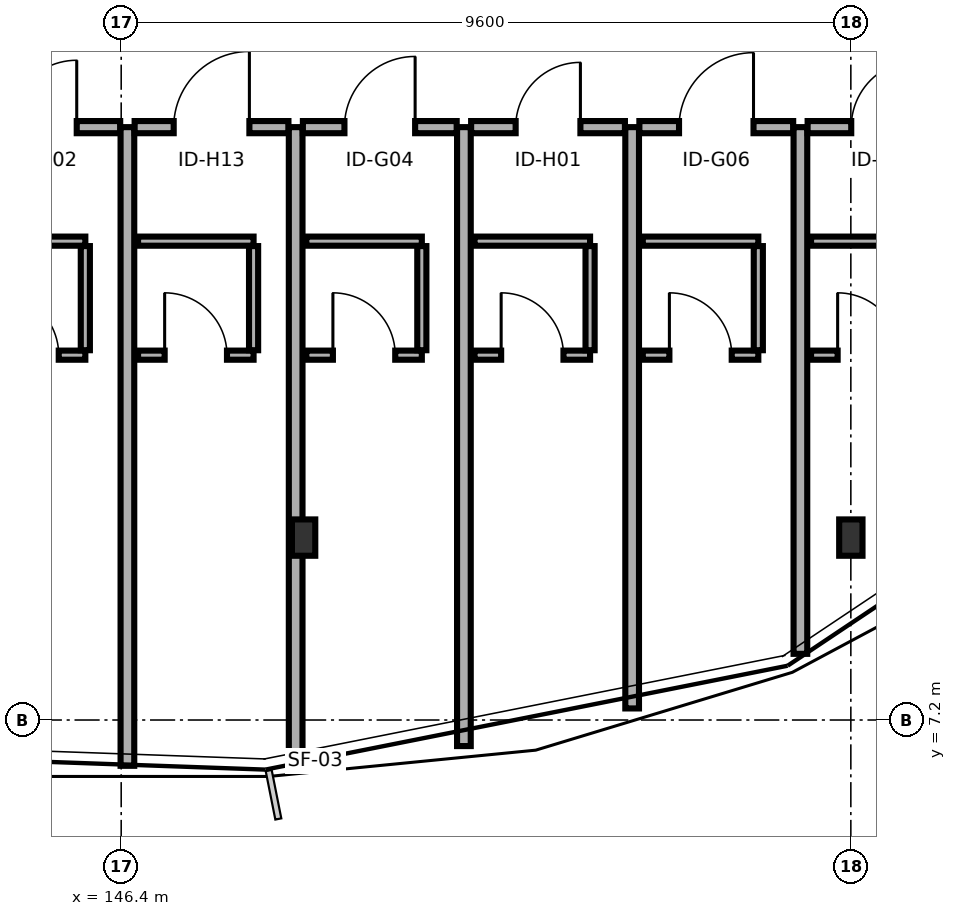
"""IFC4 building model, lengths in metres.
Left out: names, types, materials, properties, quantities, classifications, styles, units other than length and angle.
Written with IfcOpenShell. Run it as: python <this file> out.ifc"""

import sys

from ifc_helpers import new_model, si_unit, direction, frame, frame_2d, origin, origin_2d, place, context, subcontext, project, spatial, rectangle, i_section, extrude, element, fill, save


model = new_model("IFC4")
c1 = context("Model", 3, precision=1e-05, world=origin(), true_north=direction((0.0, 1.0)))
c2 = subcontext(c1, "Body", "Model", "MODEL_VIEW")
j1 = project(units=[si_unit("LENGTHUNIT", "METRE"), si_unit("PLANEANGLEUNIT", "RADIAN")], contexts=[c1])
p1 = place(None, origin())
s1 = spatial("IfcSite", under=j1, at=p1, CompositionType="ELEMENT")
p2 = place(p1, origin())
s2 = spatial("IfcBuilding", under=s1, at=p2, CompositionType="ELEMENT")
p3 = place(p2, frame((0.0, 0.0, 18.1)))
s3 = spatial("IfcBuildingStorey", under=s2, at=p3, CompositionType="ELEMENT", Elevation=18.1)
for number, where, z_axis, x_axis in (
    (1, (148.8, 9.6, 0.0), (0.0, 0.0, 1.0), (1.0, 0.0, 0.0)),
    (2, (156.0, 9.6, 0.0), (0.0, 0.0, 1.0), (1.0, 0.0, 0.0)),
):
    element("IfcColumn", number, at=place(p3, frame(where, z_axis=z_axis, x_axis=x_axis)), inside=s3, PredefinedType="COLUMN", context=c2, shape_type="SweptSolid", body=[
        extrude(i_section(OverallWidth=0.307, OverallDepth=0.478, WebThickness=0.021, FlangeThickness=0.04, FilletRadius=0.027, at=origin_2d()), origin(), (0.0, 0.0, 1.0), 3.4),
    ])
p4 = place(p3, frame((144.363, 15.0, 0.0), z_axis=(0.0, 0.0, 1.0), x_axis=(1.0, 0.0, 0.0)))
e3 = element("IfcWall", 3, at=p4, inside=s3, PredefinedType="PARTITIONING", context=c2, shape_type="SweptSolid", body=[
    extrude(rectangle(XDim=2.023, YDim=0.16, at=frame_2d((1.012, 0.0))), origin(), (0.0, 0.0, 1.0), 3.21),
])
p5 = place(p4, frame((0.572, 0.0, 0.0)))
e4 = element("IfcOpeningElement", 4, at=p5, cuts=e3, PredefinedType="OPENING", context=c2, shape_type="SweptSolid", body=[
    extrude(rectangle(XDim=0.88, YDim=2.05, at=frame_2d((0.44, 1.025))), frame((0.0, 0.09, 0.0), z_axis=(0.0, -1.0, 0.0), x_axis=(1.0, 0.0, 0.0)), (0.0, 0.0, 1.0), 0.18),
])
p6 = place(p3, frame((144.408, 12.0, 0.0), z_axis=(0.0, 0.0, 1.0), x_axis=(1.0, 0.0, 0.0)))
e5 = element("IfcWall", 5, at=p6, inside=s3, PredefinedType="PARTITIONING", context=c2, shape_type="SweptSolid", body=[
    extrude(rectangle(XDim=1.52, YDim=0.12, at=frame_2d((0.76, 0.0))), origin(), (0.0, 0.0, 1.0), 3.21),
])
p7 = place(p6, frame((0.35, 0.0, 0.0)))
e6 = element("IfcOpeningElement", 6, at=p7, cuts=e5, PredefinedType="OPENING", context=c2, shape_type="SweptSolid", body=[
    extrude(rectangle(XDim=0.82, YDim=2.08, at=frame_2d((0.41, 1.04))), frame((0.0, 0.07, 0.0), z_axis=(0.0, -1.0, 0.0), x_axis=(1.0, 0.0, 0.0)), (0.0, 0.0, 1.0), 0.14),
])
p8 = place(p3, frame((144.408, 13.5, 0.0), z_axis=(0.0, 0.0, 1.0), x_axis=(1.0, 0.0, 0.0)))
e7 = element("IfcWall", 7, at=p8, inside=s3, PredefinedType="PARTITIONING", context=c2, shape_type="SweptSolid", body=[
    extrude(rectangle(XDim=1.52, YDim=0.12, at=frame_2d((0.76, 0.0))), origin(), (0.0, 0.0, 1.0), 3.21),
])
p9 = place(p3, frame((145.928, 12.065, 0.0), z_axis=(0.0, 0.0, 1.0), x_axis=(0.0, 1.0, 0.0)))
e8 = element("IfcWall", 8, at=p9, inside=s3, PredefinedType="PARTITIONING", context=c2, shape_type="SweptSolid", body=[
    extrude(rectangle(XDim=1.37, YDim=0.12, at=frame_2d((0.685, 0.0))), origin(), (0.0, 0.0, 1.0), 3.21),
])
p10 = place(p3, frame((146.482, 6.597, 0.0), z_axis=(0.0, 0.0, 1.0), x_axis=(0.0, 1.0, 0.0)))
e9 = element("IfcWall", 9, at=p10, inside=s3, PredefinedType="PARTITIONING", context=c2, shape_type="SweptSolid", body=[
    extrude(rectangle(XDim=8.403, YDim=0.18, at=frame_2d((4.201, 0.0))), origin(), (0.0, 0.0, 1.0), 2.755),
])
p11 = place(p3, frame((146.577, 15.0, 0.0), z_axis=(0.0, 0.0, 1.0), x_axis=(1.0, 0.0, 0.0)))
e10 = element("IfcWall", 10, at=p11, inside=s3, PredefinedType="PARTITIONING", context=c2, shape_type="SweptSolid", body=[
    extrude(rectangle(XDim=2.024, YDim=0.16, at=frame_2d((1.012, 0.0))), origin(), (0.0, 0.0, 1.0), 3.21),
])
p12 = place(p11, frame((0.514, 0.0, 0.0)))
e11 = element("IfcOpeningElement", 11, at=p12, cuts=e10, PredefinedType="OPENING", context=c2, shape_type="SweptSolid", body=[
    extrude(rectangle(XDim=0.996, YDim=2.1, at=frame_2d((0.498, 1.05))), frame((0.0, 0.09, 0.0), z_axis=(0.0, -1.0, 0.0), x_axis=(1.0, 0.0, 0.0)), (0.0, 0.0, 1.0), 0.18),
])
p13 = place(p3, frame((146.622, 12.0, 0.0), z_axis=(0.0, 0.0, 1.0), x_axis=(1.0, 0.0, 0.0)))
e12 = element("IfcWall", 12, at=p13, inside=s3, PredefinedType="PARTITIONING", context=c2, shape_type="SweptSolid", body=[
    extrude(rectangle(XDim=1.52, YDim=0.12, at=frame_2d((0.76, 0.0))), origin(), (0.0, 0.0, 1.0), 3.21),
])
p14 = place(p13, frame((0.35, 0.0, 0.0)))
e13 = element("IfcOpeningElement", 13, at=p14, cuts=e12, PredefinedType="OPENING", context=c2, shape_type="SweptSolid", body=[
    extrude(rectangle(XDim=0.82, YDim=2.08, at=frame_2d((0.41, 1.04))), frame((0.0, 0.07, 0.0), z_axis=(0.0, -1.0, 0.0), x_axis=(1.0, 0.0, 0.0)), (0.0, 0.0, 1.0), 0.14),
])
p15 = place(p3, frame((146.622, 13.5, 0.0), z_axis=(0.0, 0.0, 1.0), x_axis=(1.0, 0.0, 0.0)))
e14 = element("IfcWall", 14, at=p15, inside=s3, PredefinedType="PARTITIONING", context=c2, shape_type="SweptSolid", body=[
    extrude(rectangle(XDim=1.52, YDim=0.12, at=frame_2d((0.76, 0.0))), origin(), (0.0, 0.0, 1.0), 3.21),
])
p16 = place(p3, frame((148.142, 12.065, 0.0), z_axis=(0.0, 0.0, 1.0), x_axis=(0.0, 1.0, 0.0)))
e15 = element("IfcWall", 15, at=p16, inside=s3, PredefinedType="PARTITIONING", context=c2, shape_type="SweptSolid", body=[
    extrude(rectangle(XDim=1.37, YDim=0.12, at=frame_2d((0.685, 0.0))), origin(), (0.0, 0.0, 1.0), 3.21),
])
p17 = place(p3, frame((148.696, 6.639, 0.0), z_axis=(0.0, 0.0, 1.0), x_axis=(0.0, 1.0, 0.0)))
e16 = element("IfcWall", 16, at=p17, inside=s3, PredefinedType="PARTITIONING", context=c2, shape_type="SweptSolid", body=[
    extrude(rectangle(XDim=8.361, YDim=0.18, at=frame_2d((4.18, 0.0))), origin(), (0.0, 0.0, 1.0), 2.755),
])
p18 = place(p3, frame((148.791, 15.0, 0.0), z_axis=(0.0, 0.0, 1.0), x_axis=(1.0, 0.0, 0.0)))
e17 = element("IfcWall", 17, at=p18, inside=s3, PredefinedType="PARTITIONING", context=c2, shape_type="SweptSolid", body=[
    extrude(rectangle(XDim=2.024, YDim=0.16, at=frame_2d((1.012, 0.0))), origin(), (0.0, 0.0, 1.0), 2.745),
])
p19 = place(p18, frame((0.547, 0.0, 0.0)))
e18 = element("IfcOpeningElement", 18, at=p19, cuts=e17, PredefinedType="OPENING", context=c2, shape_type="SweptSolid", body=[
    extrude(rectangle(XDim=0.93, YDim=2.05, at=frame_2d((0.465, 1.025))), frame((0.0, 0.09, 0.0), z_axis=(0.0, -1.0, 0.0), x_axis=(1.0, 0.0, 0.0)), (0.0, 0.0, 1.0), 0.18),
])
p20 = place(p3, frame((148.835, 12.0, 0.0), z_axis=(0.0, 0.0, 1.0), x_axis=(1.0, 0.0, 0.0)))
e19 = element("IfcWall", 19, at=p20, inside=s3, PredefinedType="PARTITIONING", context=c2, shape_type="SweptSolid", body=[
    extrude(rectangle(XDim=1.52, YDim=0.12, at=frame_2d((0.76, 0.0))), origin(), (0.0, 0.0, 1.0), 2.745),
])
p21 = place(p20, frame((0.35, 0.0, 0.0)))
e20 = element("IfcOpeningElement", 20, at=p21, cuts=e19, PredefinedType="OPENING", context=c2, shape_type="SweptSolid", body=[
    extrude(rectangle(XDim=0.82, YDim=2.08, at=frame_2d((0.41, 1.04))), frame((0.0, 0.07, 0.0), z_axis=(0.0, -1.0, 0.0), x_axis=(1.0, 0.0, 0.0)), (0.0, 0.0, 1.0), 0.14),
])
p22 = place(p3, frame((148.835, 13.5, 0.0), z_axis=(0.0, 0.0, 1.0), x_axis=(1.0, 0.0, 0.0)))
e21 = element("IfcWall", 21, at=p22, inside=s3, PredefinedType="PARTITIONING", context=c2, shape_type="SweptSolid", body=[
    extrude(rectangle(XDim=1.52, YDim=0.12, at=frame_2d((0.76, 0.0))), origin(), (0.0, 0.0, 1.0), 2.745),
])
p23 = place(p3, frame((150.355, 12.065, 0.0), z_axis=(0.0, 0.0, 1.0), x_axis=(0.0, 1.0, 0.0)))
e22 = element("IfcWall", 22, at=p23, inside=s3, PredefinedType="PARTITIONING", context=c2, shape_type="SweptSolid", body=[
    extrude(rectangle(XDim=1.37, YDim=0.12, at=frame_2d((0.685, 0.0))), origin(), (0.0, 0.0, 1.0), 3.21),
])
p24 = place(p3, frame((150.909, 6.857, 0.0), z_axis=(0.0, 0.0, 1.0), x_axis=(0.0, 1.0, 0.0)))
e23 = element("IfcWall", 23, at=p24, inside=s3, PredefinedType="PARTITIONING", context=c2, shape_type="SweptSolid", body=[
    extrude(rectangle(XDim=8.143, YDim=0.18, at=frame_2d((4.071, 0.0))), origin(), (0.0, 0.0, 1.0), 2.755),
])
p25 = place(p3, frame((151.004, 15.0, 0.0), z_axis=(0.0, 0.0, 1.0), x_axis=(1.0, 0.0, 0.0)))
e24 = element("IfcWall", 24, at=p25, inside=s3, PredefinedType="PARTITIONING", context=c2, shape_type="SweptSolid", body=[
    extrude(rectangle(XDim=2.023, YDim=0.16, at=frame_2d((1.012, 0.0))), origin(), (0.0, 0.0, 1.0), 3.21),
])
p26 = place(p25, frame((0.586, 0.0, 0.0)))
e25 = element("IfcOpeningElement", 25, at=p26, cuts=e24, PredefinedType="OPENING", context=c2, shape_type="SweptSolid", body=[
    extrude(rectangle(XDim=0.852, YDim=2.1, at=frame_2d((0.426, 1.05))), frame((0.0, 0.09, 0.0), z_axis=(0.0, -1.0, 0.0), x_axis=(1.0, 0.0, 0.0)), (0.0, 0.0, 1.0), 0.18),
])
p27 = place(p3, frame((151.049, 12.0, 0.0), z_axis=(0.0, 0.0, 1.0), x_axis=(1.0, 0.0, 0.0)))
e26 = element("IfcWall", 26, at=p27, inside=s3, PredefinedType="PARTITIONING", context=c2, shape_type="SweptSolid", body=[
    extrude(rectangle(XDim=1.52, YDim=0.12, at=frame_2d((0.76, 0.0))), origin(), (0.0, 0.0, 1.0), 3.21),
])
p28 = place(p27, frame((0.35, 0.0, 0.0)))
e27 = element("IfcOpeningElement", 27, at=p28, cuts=e26, PredefinedType="OPENING", context=c2, shape_type="SweptSolid", body=[
    extrude(rectangle(XDim=0.82, YDim=2.08, at=frame_2d((0.41, 1.04))), frame((0.0, 0.07, 0.0), z_axis=(0.0, -1.0, 0.0), x_axis=(1.0, 0.0, 0.0)), (0.0, 0.0, 1.0), 0.14),
])
p29 = place(p3, frame((151.049, 13.5, 0.0), z_axis=(0.0, 0.0, 1.0), x_axis=(1.0, 0.0, 0.0)))
e28 = element("IfcWall", 28, at=p29, inside=s3, PredefinedType="PARTITIONING", context=c2, shape_type="SweptSolid", body=[
    extrude(rectangle(XDim=1.52, YDim=0.12, at=frame_2d((0.76, 0.0))), origin(), (0.0, 0.0, 1.0), 3.21),
])
p30 = place(p3, frame((152.569, 12.065, 0.0), z_axis=(0.0, 0.0, 1.0), x_axis=(0.0, 1.0, 0.0)))
e29 = element("IfcWall", 29, at=p30, inside=s3, PredefinedType="PARTITIONING", context=c2, shape_type="SweptSolid", body=[
    extrude(rectangle(XDim=1.37, YDim=0.12, at=frame_2d((0.685, 0.0))), origin(), (0.0, 0.0, 1.0), 3.21),
])
p31 = place(p3, frame((153.123, 7.352, 0.0), z_axis=(0.0, 0.0, 1.0), x_axis=(0.0, 1.0, 0.0)))
e30 = element("IfcWall", 30, at=p31, inside=s3, PredefinedType="PARTITIONING", context=c2, shape_type="SweptSolid", body=[
    extrude(rectangle(XDim=7.648, YDim=0.18, at=frame_2d((3.824, 0.0))), origin(), (0.0, 0.0, 1.0), 2.755),
])
p32 = place(p3, frame((153.218, 15.0, 0.0), z_axis=(0.0, 0.0, 1.0), x_axis=(1.0, 0.0, 0.0)))
e31 = element("IfcWall", 31, at=p32, inside=s3, PredefinedType="PARTITIONING", context=c2, shape_type="SweptSolid", body=[
    extrude(rectangle(XDim=2.024, YDim=0.16, at=frame_2d((1.012, 0.0))), origin(), (0.0, 0.0, 1.0), 3.21),
])
p33 = place(p32, frame((0.522, 0.0, 0.0)))
e32 = element("IfcOpeningElement", 32, at=p33, cuts=e31, PredefinedType="OPENING", context=c2, shape_type="SweptSolid", body=[
    extrude(rectangle(XDim=0.98, YDim=2.05, at=frame_2d((0.49, 1.025))), frame((0.0, 0.09, 0.0), z_axis=(0.0, -1.0, 0.0), x_axis=(1.0, 0.0, 0.0)), (0.0, 0.0, 1.0), 0.18),
])
p34 = place(p3, frame((153.263, 12.0, 0.0), z_axis=(0.0, 0.0, 1.0), x_axis=(1.0, 0.0, 0.0)))
e33 = element("IfcWall", 33, at=p34, inside=s3, PredefinedType="PARTITIONING", context=c2, shape_type="SweptSolid", body=[
    extrude(rectangle(XDim=1.52, YDim=0.12, at=frame_2d((0.76, 0.0))), origin(), (0.0, 0.0, 1.0), 3.21),
])
p35 = place(p34, frame((0.35, 0.0, 0.0)))
e34 = element("IfcOpeningElement", 34, at=p35, cuts=e33, PredefinedType="OPENING", context=c2, shape_type="SweptSolid", body=[
    extrude(rectangle(XDim=0.82, YDim=2.08, at=frame_2d((0.41, 1.04))), frame((0.0, 0.07, 0.0), z_axis=(0.0, -1.0, 0.0), x_axis=(1.0, 0.0, 0.0)), (0.0, 0.0, 1.0), 0.14),
])
p36 = place(p3, frame((153.263, 13.5, 0.0), z_axis=(0.0, 0.0, 1.0), x_axis=(1.0, 0.0, 0.0)))
e35 = element("IfcWall", 35, at=p36, inside=s3, PredefinedType="PARTITIONING", context=c2, shape_type="SweptSolid", body=[
    extrude(rectangle(XDim=1.52, YDim=0.12, at=frame_2d((0.76, 0.0))), origin(), (0.0, 0.0, 1.0), 3.21),
])
p37 = place(p3, frame((154.783, 12.065, 0.0), z_axis=(0.0, 0.0, 1.0), x_axis=(0.0, 1.0, 0.0)))
e36 = element("IfcWall", 36, at=p37, inside=s3, PredefinedType="PARTITIONING", context=c2, shape_type="SweptSolid", body=[
    extrude(rectangle(XDim=1.37, YDim=0.12, at=frame_2d((0.685, 0.0))), origin(), (0.0, 0.0, 1.0), 3.21),
])
p38 = place(p3, frame((155.336, 8.071, 0.0), z_axis=(0.0, 0.0, 1.0), x_axis=(0.0, 1.0, 0.0)))
e37 = element("IfcWall", 37, at=p38, inside=s3, PredefinedType="PARTITIONING", context=c2, shape_type="SweptSolid", body=[
    extrude(rectangle(XDim=6.929, YDim=0.18, at=frame_2d((3.465, 0.0))), origin(), (0.0, 0.0, 1.0), 2.755),
])
p39 = place(p3, frame((155.431, 15.0, 0.0), z_axis=(0.0, 0.0, 1.0), x_axis=(1.0, 0.0, 0.0)))
e38 = element("IfcWall", 38, at=p39, inside=s3, PredefinedType="PARTITIONING", context=c2, shape_type="SweptSolid", body=[
    extrude(rectangle(XDim=2.024, YDim=0.16, at=frame_2d((1.012, 0.0))), origin(), (0.0, 0.0, 1.0), 2.745),
])
p40 = place(p39, frame((0.574, 0.0, 0.0)))
e39 = element("IfcOpeningElement", 39, at=p40, cuts=e38, PredefinedType="OPENING", context=c2, shape_type="SweptSolid", body=[
    extrude(rectangle(XDim=0.876, YDim=2.16, at=frame_2d((0.438, 1.08))), frame((0.0, 0.09, 0.0), z_axis=(0.0, -1.0, 0.0), x_axis=(1.0, 0.0, 0.0)), (0.0, 0.0, 1.0), 0.18),
])
p41 = place(p3, frame((155.476, 12.0, 0.0), z_axis=(0.0, 0.0, 1.0), x_axis=(1.0, 0.0, 0.0)))
e40 = element("IfcWall", 40, at=p41, inside=s3, PredefinedType="PARTITIONING", context=c2, shape_type="SweptSolid", body=[
    extrude(rectangle(XDim=1.52, YDim=0.12, at=frame_2d((0.76, 0.0))), origin(), (0.0, 0.0, 1.0), 2.745),
])
p42 = place(p41, frame((0.35, 0.0, 0.0)))
e41 = element("IfcOpeningElement", 41, at=p42, cuts=e40, PredefinedType="OPENING", context=c2, shape_type="SweptSolid", body=[
    extrude(rectangle(XDim=0.82, YDim=2.08, at=frame_2d((0.41, 1.04))), frame((0.0, 0.07, 0.0), z_axis=(0.0, -1.0, 0.0), x_axis=(1.0, 0.0, 0.0)), (0.0, 0.0, 1.0), 0.14),
])
p43 = place(p3, frame((155.476, 13.5, 0.0), z_axis=(0.0, 0.0, 1.0), x_axis=(1.0, 0.0, 0.0)))
e42 = element("IfcWall", 42, at=p43, inside=s3, PredefinedType="PARTITIONING", context=c2, shape_type="SweptSolid", body=[
    extrude(rectangle(XDim=1.52, YDim=0.12, at=frame_2d((0.76, 0.0))), origin(), (0.0, 0.0, 1.0), 2.745),
])
p44 = place(p5, origin())
e43 = element("IfcDoor", 43, at=p44, inside=s3, OperationType="SINGLE_SWING_RIGHT", PredefinedType="DOOR", context=c2, shape_type="SweptSolid", body=[
    extrude(rectangle(XDim=0.88, YDim=2.05, at=frame_2d((0.44, 1.025))), frame((0.0, 0.025, 0.0), z_axis=(0.0, -1.0, 0.0), x_axis=(1.0, 0.0, 0.0)), (0.0, 0.0, 1.0), 0.05),
])
fill(e4, e43)
p45 = place(p7, origin())
e44 = element("IfcDoor", 44, at=p45, inside=s3, OperationType="SINGLE_SWING_LEFT", PredefinedType="DOOR", context=c2, shape_type="SweptSolid", body=[
    extrude(rectangle(XDim=0.82, YDim=2.08, at=frame_2d((0.41, 1.04))), frame((0.0, 0.025, 0.0), z_axis=(0.0, -1.0, 0.0), x_axis=(1.0, 0.0, 0.0)), (0.0, 0.0, 1.0), 0.05),
])
fill(e6, e44)
p46 = place(p12, origin())
e45 = element("IfcDoor", 45, at=p46, inside=s3, OperationType="SINGLE_SWING_RIGHT", PredefinedType="DOOR", context=c2, shape_type="SweptSolid", body=[
    extrude(rectangle(XDim=0.996, YDim=2.1, at=frame_2d((0.498, 1.05))), frame((0.0, 0.025, 0.0), z_axis=(0.0, -1.0, 0.0), x_axis=(1.0, 0.0, 0.0)), (0.0, 0.0, 1.0), 0.05),
])
fill(e11, e45)
p47 = place(p14, origin())
e46 = element("IfcDoor", 46, at=p47, inside=s3, OperationType="SINGLE_SWING_LEFT", PredefinedType="DOOR", context=c2, shape_type="SweptSolid", body=[
    extrude(rectangle(XDim=0.82, YDim=2.08, at=frame_2d((0.41, 1.04))), frame((0.0, 0.025, 0.0), z_axis=(0.0, -1.0, 0.0), x_axis=(1.0, 0.0, 0.0)), (0.0, 0.0, 1.0), 0.05),
])
fill(e13, e46)
p48 = place(p19, origin())
e47 = element("IfcDoor", 47, at=p48, inside=s3, OperationType="SINGLE_SWING_RIGHT", PredefinedType="DOOR", context=c2, shape_type="SweptSolid", body=[
    extrude(rectangle(XDim=0.93, YDim=2.05, at=frame_2d((0.465, 1.025))), frame((0.0, 0.025, 0.0), z_axis=(0.0, -1.0, 0.0), x_axis=(1.0, 0.0, 0.0)), (0.0, 0.0, 1.0), 0.05),
])
fill(e18, e47)
p49 = place(p21, origin())
e48 = element("IfcDoor", 48, at=p49, inside=s3, OperationType="SINGLE_SWING_LEFT", PredefinedType="DOOR", context=c2, shape_type="SweptSolid", body=[
    extrude(rectangle(XDim=0.82, YDim=2.08, at=frame_2d((0.41, 1.04))), frame((0.0, 0.025, 0.0), z_axis=(0.0, -1.0, 0.0), x_axis=(1.0, 0.0, 0.0)), (0.0, 0.0, 1.0), 0.05),
])
fill(e20, e48)
p50 = place(p26, origin())
e49 = element("IfcDoor", 49, at=p50, inside=s3, OperationType="SINGLE_SWING_RIGHT", PredefinedType="DOOR", context=c2, shape_type="SweptSolid", body=[
    extrude(rectangle(XDim=0.852, YDim=2.1, at=frame_2d((0.426, 1.05))), frame((0.0, 0.025, 0.0), z_axis=(0.0, -1.0, 0.0), x_axis=(1.0, 0.0, 0.0)), (0.0, 0.0, 1.0), 0.05),
])
fill(e25, e49)
p51 = place(p28, origin())
e50 = element("IfcDoor", 50, at=p51, inside=s3, OperationType="SINGLE_SWING_LEFT", PredefinedType="DOOR", context=c2, shape_type="SweptSolid", body=[
    extrude(rectangle(XDim=0.82, YDim=2.08, at=frame_2d((0.41, 1.04))), frame((0.0, 0.025, 0.0), z_axis=(0.0, -1.0, 0.0), x_axis=(1.0, 0.0, 0.0)), (0.0, 0.0, 1.0), 0.05),
])
fill(e27, e50)
p52 = place(p33, origin())
e51 = element("IfcDoor", 51, at=p52, inside=s3, OperationType="SINGLE_SWING_RIGHT", PredefinedType="DOOR", context=c2, shape_type="SweptSolid", body=[
    extrude(rectangle(XDim=0.98, YDim=2.05, at=frame_2d((0.49, 1.025))), frame((0.0, 0.025, 0.0), z_axis=(0.0, -1.0, 0.0), x_axis=(1.0, 0.0, 0.0)), (0.0, 0.0, 1.0), 0.05),
])
fill(e32, e51)
p53 = place(p35, origin())
e52 = element("IfcDoor", 52, at=p53, inside=s3, OperationType="SINGLE_SWING_LEFT", PredefinedType="DOOR", context=c2, shape_type="SweptSolid", body=[
    extrude(rectangle(XDim=0.82, YDim=2.08, at=frame_2d((0.41, 1.04))), frame((0.0, 0.025, 0.0), z_axis=(0.0, -1.0, 0.0), x_axis=(1.0, 0.0, 0.0)), (0.0, 0.0, 1.0), 0.05),
])
fill(e34, e52)
p54 = place(p40, origin())
e53 = element("IfcDoor", 53, at=p54, inside=s3, OperationType="SINGLE_SWING_RIGHT", PredefinedType="DOOR", context=c2, shape_type="SweptSolid", body=[
    extrude(rectangle(XDim=0.876, YDim=2.16, at=frame_2d((0.438, 1.08))), frame((0.0, 0.025, 0.0), z_axis=(0.0, -1.0, 0.0), x_axis=(1.0, 0.0, 0.0)), (0.0, 0.0, 1.0), 0.05),
])
fill(e39, e53)
p55 = place(p42, origin())
e54 = element("IfcDoor", 54, at=p55, inside=s3, OperationType="SINGLE_SWING_LEFT", PredefinedType="DOOR", context=c2, shape_type="SweptSolid", body=[
    extrude(rectangle(XDim=0.82, YDim=2.08, at=frame_2d((0.41, 1.04))), frame((0.0, 0.025, 0.0), z_axis=(0.0, -1.0, 0.0), x_axis=(1.0, 0.0, 0.0)), (0.0, 0.0, 1.0), 0.05),
])
fill(e41, e54)
save(model, sys.argv[1])
